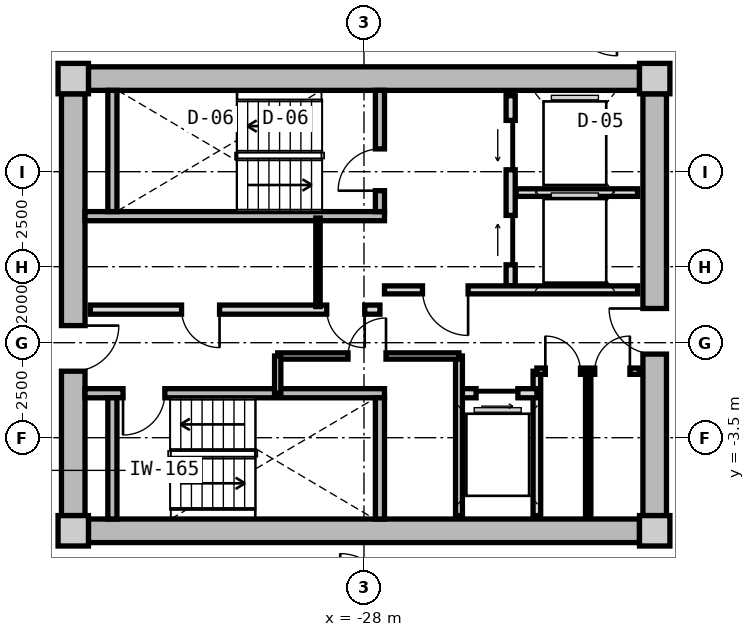
"""IFC4 building model, lengths in metres.
Left out: names, types, materials, properties, quantities, classifications, styles, units other than length and angle.
Written with IfcOpenShell. Run it as: python <this file> out.ifc"""

import sys

from ifc_helpers import new_model, si_unit, direction, frame, frame_2d, origin, origin_2d, place, context, subcontext, project, spatial, rectangle, extrude, source, transform, mapped, element, fill, save


model = new_model("IFC4")
c1 = context("Model", 3, precision=1e-05, world=origin(), true_north=direction((0.0, 1.0)))
c2 = subcontext(c1, "Body", "Model", "MODEL_VIEW")
j1 = project(units=[si_unit("LENGTHUNIT", "METRE"), si_unit("PLANEANGLEUNIT", "RADIAN")], contexts=[c1])
p1 = place(None, origin())
s1 = spatial("IfcSite", under=j1, at=p1, CompositionType="ELEMENT")
p2 = place(p1, origin())
s2 = spatial("IfcBuilding", under=s1, at=p2, CompositionType="ELEMENT")
p3 = place(p2, frame((0.0, 0.0, 161.75)))
s3 = spatial("IfcBuildingStorey", under=s2, at=p3, CompositionType="ELEMENT", Elevation=161.75)
m1 = source(origin(), c2, "Body", "SweptSolid", [
    extrude(rectangle(XDim=0.8, YDim=0.8, at=origin_2d()), origin(), (0.0, 0.0, 1.0), 3.05),
])
for number, where, z_axis, x_axis in (
    (1, (-35.65, -5.95, 0.0), (0.0, 0.0, 1.0), (1.0, 0.0, 0.0)),
    (2, (-20.35, -5.95, 0.0), (0.0, 0.0, 1.0), (1.0, 0.0, 0.0)),
    (3, (-20.35, 5.95, 0.0), (0.0, 0.0, 1.0), (1.0, 0.0, 0.0)),
    (4, (-35.65, 5.95, 0.0), (0.0, 0.0, 1.0), (1.0, 0.0, 0.0)),
):
    element("IfcColumn", number, at=place(p3, frame(where, z_axis=z_axis, x_axis=x_axis)), inside=s3, PredefinedType="COLUMN", context=c2, shape_type="MappedRepresentation", body=[
        mapped(m1, transform((0.0, 0.0, 0.0), x_axis=(1.0, 0.0, 0.0), y_axis=(0.0, 1.0, 0.0), z_axis=(0.0, 0.0, 1.0), scale=1.0)),
    ])
m2 = source(origin(), c2, "Body", "SweptSolid", [
    extrude(rectangle(XDim=14.5, YDim=0.62, at=frame_2d((7.25, 0.0))), origin(), (0.0, 0.0, 1.0), 2.81),
])
for number, where, z_axis, x_axis in (
    (5, (-35.25, 5.95, 0.0), (0.0, 0.0, 1.0), (1.0, 0.0, 0.0)),
    (6, (-20.75, -5.95, 0.0), (0.0, 0.0, 1.0), (-1.0, 0.0, 0.0)),
):
    element("IfcWall", number, at=place(p3, frame(where, z_axis=z_axis, x_axis=x_axis)), inside=s3, PredefinedType="SHEAR", context=c2, shape_type="MappedRepresentation", body=[
        mapped(m2, transform((0.0, 0.0, 0.0), x_axis=(1.0, 0.0, 0.0), y_axis=(0.0, 1.0, 0.0), z_axis=(0.0, 0.0, 1.0), scale=1.0)),
    ])
m3 = source(origin(), c2, "Body", "SweptSolid", [
    extrude(rectangle(XDim=11.1, YDim=0.62, at=frame_2d((5.55, 0.0))), origin(), (0.0, 0.0, 1.0), 2.81),
])
p4 = place(p3, frame((-35.65, -5.55, 0.0), z_axis=(0.0, 0.0, 1.0), x_axis=(0.0, 1.0, 0.0)))
e7 = element("IfcWall", 7, at=p4, inside=s3, PredefinedType="SHEAR", context=c2, shape_type="MappedRepresentation", body=[
    mapped(m3, transform((0.0, 0.0, 0.0), x_axis=(1.0, 0.0, 0.0), y_axis=(0.0, 1.0, 0.0), z_axis=(0.0, 0.0, 1.0), scale=1.0)),
])
p5 = place(p4, frame((3.8, 0.0, 0.0)))
e8 = element("IfcOpeningElement", 8, at=p5, cuts=e7, PredefinedType="OPENING", context=c2, shape_type="SweptSolid", body=[
    extrude(rectangle(XDim=1.2, YDim=2.15, at=frame_2d((0.6, 1.075))), frame((0.0, 0.32, 0.0), z_axis=(0.0, -1.0, 0.0), x_axis=(1.0, 0.0, 0.0)), (0.0, 0.0, 1.0), 0.64),
])
p6 = place(p3, frame((-20.35, 5.55, 0.0), z_axis=(0.0, 0.0, 1.0), x_axis=(0.0, -1.0, 0.0)))
e9 = element("IfcWall", 9, at=p6, inside=s3, PredefinedType="SHEAR", context=c2, shape_type="MappedRepresentation", body=[
    mapped(m3, transform((0.0, 0.0, 0.0), x_axis=(1.0, 0.0, 0.0), y_axis=(0.0, 1.0, 0.0), z_axis=(0.0, 0.0, 1.0), scale=1.0)),
])
p7 = place(p6, frame((5.65, 0.0, 0.0)))
e10 = element("IfcOpeningElement", 10, at=p7, cuts=e9, PredefinedType="OPENING", context=c2, shape_type="SweptSolid", body=[
    extrude(rectangle(XDim=1.2, YDim=2.15, at=frame_2d((0.6, 1.075))), frame((0.0, 0.32, 0.0), z_axis=(0.0, -1.0, 0.0), x_axis=(1.0, 0.0, 0.0)), (0.0, 0.0, 1.0), 0.64),
])
m4 = source(origin(), c2, "Body", "SweptSolid", [
    extrude(rectangle(XDim=7.88, YDim=0.24, at=frame_2d((3.94, 0.0))), origin(), (0.0, 0.0, 1.0), 2.81),
])
p8 = place(p3, frame((-35.34, 2.33, 0.0), z_axis=(0.0, 0.0, 1.0), x_axis=(1.0, 0.0, 0.0)))
e11 = element("IfcWall", 11, at=p8, inside=s3, PredefinedType="PARTITIONING", context=c2, shape_type="MappedRepresentation", body=[
    mapped(m4, transform((0.0, 0.0, 0.0), x_axis=(1.0, 0.0, 0.0), y_axis=(0.0, 1.0, 0.0), z_axis=(0.0, 0.0, 1.0), scale=1.0)),
])
m5 = source(origin(), c2, "Body", "SweptSolid", [
    extrude(rectangle(XDim=3.19, YDim=0.24, at=frame_2d((1.595, 0.0))), origin(), (0.0, 0.0, 1.0), 2.81),
])
p9 = place(p3, frame((-34.62, 2.45, 0.0), z_axis=(0.0, 0.0, 1.0), x_axis=(0.0, 1.0, 0.0)))
e12 = element("IfcWall", 12, at=p9, inside=s3, PredefinedType="PARTITIONING", context=c2, shape_type="MappedRepresentation", body=[
    mapped(m5, transform((0.0, 0.0, 0.0), x_axis=(1.0, 0.0, 0.0), y_axis=(0.0, 1.0, 0.0), z_axis=(0.0, 0.0, 1.0), scale=1.0)),
])
p10 = place(p3, frame((-27.58, 2.45, 0.0), z_axis=(0.0, 0.0, 1.0), x_axis=(0.0, 1.0, 0.0)))
e13 = element("IfcWall", 13, at=p10, inside=s3, PredefinedType="PARTITIONING", context=c2, shape_type="MappedRepresentation", body=[
    mapped(m5, transform((0.0, 0.0, 0.0), x_axis=(1.0, 0.0, 0.0), y_axis=(0.0, 1.0, 0.0), z_axis=(0.0, 0.0, 1.0), scale=1.0)),
])
p11 = place(p10, frame((0.55, 0.0, 0.0)))
e14 = element("IfcOpeningElement", 14, at=p11, cuts=e13, PredefinedType="OPENING", context=c2, shape_type="SweptSolid", body=[
    extrude(rectangle(XDim=1.1, YDim=2.15, at=frame_2d((0.55, 1.075))), frame((0.0, 0.13, 0.0), z_axis=(0.0, -1.0, 0.0), x_axis=(1.0, 0.0, 0.0)), (0.0, 0.0, 1.0), 0.26),
])
p12 = place(p3, frame((-35.34, -2.33, 0.0), z_axis=(0.0, 0.0, 1.0), x_axis=(1.0, 0.0, 0.0)))
e15 = element("IfcWall", 15, at=p12, inside=s3, PredefinedType="PARTITIONING", context=c2, shape_type="MappedRepresentation", body=[
    mapped(m4, transform((0.0, 0.0, 0.0), x_axis=(1.0, 0.0, 0.0), y_axis=(0.0, 1.0, 0.0), z_axis=(0.0, 0.0, 1.0), scale=1.0)),
])
p13 = place(p12, frame((1.0, 0.0, 0.0)))
e16 = element("IfcOpeningElement", 16, at=p13, cuts=e15, PredefinedType="OPENING", context=c2, shape_type="SweptSolid", body=[
    extrude(rectangle(XDim=1.1, YDim=2.15, at=frame_2d((0.55, 1.075))), frame((0.0, 0.13, 0.0), z_axis=(0.0, -1.0, 0.0), x_axis=(1.0, 0.0, 0.0)), (0.0, 0.0, 1.0), 0.26),
])
for number, where, z_axis, x_axis in (
    (17, (-34.62, -5.64, 0.0), (0.0, 0.0, 1.0), (0.0, 1.0, 0.0)),
    (18, (-27.58, -5.64, 0.0), (0.0, 0.0, 1.0), (0.0, 1.0, 0.0)),
):
    element("IfcWall", number, at=place(p3, frame(where, z_axis=z_axis, x_axis=x_axis)), inside=s3, PredefinedType="PARTITIONING", context=c2, shape_type="MappedRepresentation", body=[
        mapped(m5, transform((0.0, 0.0, 0.0), x_axis=(1.0, 0.0, 0.0), y_axis=(0.0, 1.0, 0.0), z_axis=(0.0, 0.0, 1.0), scale=1.0)),
    ])
m6 = source(origin(), c2, "Body", "SweptSolid", [
    extrude(rectangle(XDim=5.0, YDim=0.24, at=frame_2d((2.5, 0.0))), origin(), (0.0, 0.0, 1.0), 2.795),
])
p14 = place(p3, frame((-24.14, 0.5, 0.0), z_axis=(0.0, 0.0, 1.0), x_axis=(0.0, 1.0, 0.0)))
e19 = element("IfcWall", 19, at=p14, inside=s3, PredefinedType="PARTITIONING", context=c2, shape_type="MappedRepresentation", body=[
    mapped(m6, transform((0.0, 0.0, 0.0), x_axis=(1.0, 0.0, 0.0), y_axis=(0.0, 1.0, 0.0), z_axis=(0.0, 0.0, 1.0), scale=1.0)),
])
p15 = place(p14, frame((3.05, 0.0, 0.0)))
e20 = element("IfcOpeningElement", 20, at=p15, cuts=e19, PredefinedType="OPENING", context=c2, shape_type="SweptSolid", body=[
    extrude(rectangle(XDim=1.3, YDim=2.2, at=frame_2d((0.65, 1.1))), frame((0.0, 0.13, 0.0), z_axis=(0.0, -1.0, 0.0), x_axis=(1.0, 0.0, 0.0)), (0.0, 0.0, 1.0), 0.26),
])
p16 = place(p14, frame((0.55, 0.0, 0.0)))
e21 = element("IfcOpeningElement", 21, at=p16, cuts=e19, PredefinedType="OPENING", context=c2, shape_type="SweptSolid", body=[
    extrude(rectangle(XDim=1.3, YDim=2.2, at=frame_2d((0.65, 1.1))), frame((0.0, 0.13, 0.0), z_axis=(0.0, -1.0, 0.0), x_axis=(1.0, 0.0, 0.0)), (0.0, 0.0, 1.0), 0.26),
])
m7 = source(origin(), c2, "Body", "SweptSolid", [
    extrude(rectangle(XDim=3.2, YDim=0.2, at=frame_2d((1.6, 0.0))), origin(), (0.0, 0.0, 1.0), 2.795),
])
p17 = place(p3, frame((-24.0, 2.95, 0.0), z_axis=(0.0, 0.0, 1.0), x_axis=(1.0, 0.0, 0.0)))
e22 = element("IfcWall", 22, at=p17, inside=s3, PredefinedType="PARTITIONING", context=c2, shape_type="MappedRepresentation", body=[
    mapped(m7, transform((0.0, 0.0, 0.0), x_axis=(1.0, 0.0, 0.0), y_axis=(0.0, 1.0, 0.0), z_axis=(0.0, 0.0, 1.0), scale=1.0)),
])
m8 = source(origin(), c2, "Body", "SweptSolid", [
    extrude(rectangle(XDim=6.66, YDim=0.21, at=frame_2d((3.33, 0.0))), origin(), (0.0, 0.0, 1.0), 2.795),
])
p18 = place(p3, frame((-27.46, 0.39, 0.0), z_axis=(0.0, 0.0, 1.0), x_axis=(1.0, 0.0, 0.0)))
e23 = element("IfcWall", 23, at=p18, inside=s3, PredefinedType="PARTITIONING", context=c2, shape_type="MappedRepresentation", body=[
    mapped(m8, transform((0.0, 0.0, 0.0), x_axis=(1.0, 0.0, 0.0), y_axis=(0.0, 1.0, 0.0), z_axis=(0.0, 0.0, 1.0), scale=1.0)),
])
p19 = place(p18, frame((1.0, 0.0, 0.0)))
e24 = element("IfcOpeningElement", 24, at=p19, cuts=e23, PredefinedType="OPENING", context=c2, shape_type="SweptSolid", body=[
    extrude(rectangle(XDim=1.2, YDim=2.15, at=frame_2d((0.6, 1.075))), frame((0.0, 0.115, 0.0), z_axis=(0.0, -1.0, 0.0), x_axis=(1.0, 0.0, 0.0)), (0.0, 0.0, 1.0), 0.23),
])
m9 = source(origin(), c2, "Body", "SweptSolid", [
    extrude(rectangle(XDim=7.62, YDim=0.24, at=frame_2d((3.81, 0.0))), origin(), (0.0, 0.0, 1.0), 2.795),
])
p20 = place(p3, frame((-35.2, -0.13, 0.0), z_axis=(0.0, 0.0, 1.0), x_axis=(1.0, 0.0, 0.0)))
e25 = element("IfcWall", 25, at=p20, inside=s3, PredefinedType="PARTITIONING", context=c2, shape_type="MappedRepresentation", body=[
    mapped(m9, transform((0.0, 0.0, 0.0), x_axis=(1.0, 0.0, 0.0), y_axis=(0.0, 1.0, 0.0), z_axis=(0.0, 0.0, 1.0), scale=1.0)),
])
p21 = place(p20, frame((6.22, 0.0, 0.0)))
e26 = element("IfcOpeningElement", 26, at=p21, cuts=e25, PredefinedType="OPENING", context=c2, shape_type="SweptSolid", body=[
    extrude(rectangle(XDim=1.0, YDim=2.1, at=frame_2d((0.5, 1.05))), frame((0.0, 0.13, 0.0), z_axis=(0.0, -1.0, 0.0), x_axis=(1.0, 0.0, 0.0)), (0.0, 0.0, 1.0), 0.26),
])
p22 = place(p20, frame((2.4, 0.0, 0.0)))
e27 = element("IfcOpeningElement", 27, at=p22, cuts=e25, PredefinedType="OPENING", context=c2, shape_type="SweptSolid", body=[
    extrude(rectangle(XDim=1.0, YDim=2.1, at=frame_2d((0.5, 1.05))), frame((0.0, 0.13, 0.0), z_axis=(0.0, -1.0, 0.0), x_axis=(1.0, 0.0, 0.0)), (0.0, 0.0, 1.0), 0.26),
])
m10 = source(origin(), c2, "Body", "SweptSolid", [
    extrude(rectangle(XDim=2.33, YDim=0.115, at=frame_2d((1.165, 0.0))), origin(), (0.0, 0.0, 1.0), 2.795),
])
p23 = place(p3, frame((-29.21, -0.05, 0.0), z_axis=(0.0, 0.0, 1.0), x_axis=(0.0, 1.0, 0.0)))
e28 = element("IfcWall", 28, at=p23, inside=s3, PredefinedType="PARTITIONING", context=c2, shape_type="MappedRepresentation", body=[
    mapped(m10, transform((0.0, 0.0, 0.0), x_axis=(1.0, 0.0, 0.0), y_axis=(0.0, 1.0, 0.0), z_axis=(0.0, 0.0, 1.0), scale=1.0)),
])
m11 = source(origin(), c2, "Body", "SweptSolid", [
    extrude(rectangle(XDim=3.8, YDim=0.2, at=frame_2d((1.9, 0.0))), origin(), (0.0, 0.0, 1.0), 2.795),
])
p24 = place(p3, frame((-23.45, -5.55, 0.0), z_axis=(0.0, 0.0, 1.0), x_axis=(0.0, 1.0, 0.0)))
e29 = element("IfcWall", 29, at=p24, inside=s3, PredefinedType="PARTITIONING", context=c2, shape_type="MappedRepresentation", body=[
    mapped(m11, transform((0.0, 0.0, 0.0), x_axis=(1.0, 0.0, 0.0), y_axis=(0.0, 1.0, 0.0), z_axis=(0.0, 0.0, 1.0), scale=1.0)),
])
m12 = source(origin(), c2, "Body", "SweptSolid", [
    extrude(rectangle(XDim=2.05, YDim=0.24, at=frame_2d((1.025, 0.0))), origin(), (0.0, 0.0, 1.0), 2.795),
])
p25 = place(p3, frame((-25.5, -2.33, 0.0), z_axis=(0.0, 0.0, 1.0), x_axis=(1.0, 0.0, 0.0)))
e30 = element("IfcWall", 30, at=p25, inside=s3, PredefinedType="PARTITIONING", context=c2, shape_type="MappedRepresentation", body=[
    mapped(m12, transform((0.0, 0.0, 0.0), x_axis=(1.0, 0.0, 0.0), y_axis=(0.0, 1.0, 0.0), z_axis=(0.0, 0.0, 1.0), scale=1.0)),
])
p26 = place(p25, frame((0.45, 0.0, 0.0)))
e31 = element("IfcOpeningElement", 31, at=p26, cuts=e30, PredefinedType="OPENING", context=c2, shape_type="SweptSolid", body=[
    extrude(rectangle(XDim=1.1, YDim=2.2, at=frame_2d((0.55, 1.1))), frame((0.0, 0.13, 0.0), z_axis=(0.0, -1.0, 0.0), x_axis=(1.0, 0.0, 0.0)), (0.0, 0.0, 1.0), 0.26),
])
m13 = source(origin(), c2, "Body", "SweptSolid", [
    extrude(rectangle(XDim=4.2, YDim=0.18, at=frame_2d((2.1, 0.0))), origin(), (0.0, 0.0, 1.0), 2.795),
])
p27 = place(p3, frame((-25.5, -5.55, 0.0), z_axis=(0.0, 0.0, 1.0), x_axis=(0.0, 1.0, 0.0)))
e32 = element("IfcWall", 32, at=p27, inside=s3, PredefinedType="PARTITIONING", context=c2, shape_type="MappedRepresentation", body=[
    mapped(m13, transform((0.0, 0.0, 0.0), x_axis=(1.0, 0.0, 0.0), y_axis=(0.0, 1.0, 0.0), z_axis=(0.0, 0.0, 1.0), scale=1.0)),
])
m14 = source(origin(), c2, "Body", "SweptSolid", [
    extrude(rectangle(XDim=4.77, YDim=0.165, at=frame_2d((2.385, 0.0))), origin(), (0.0, 0.0, 1.0), 2.795),
])
p28 = place(p3, frame((-30.27, -1.35, 0.0), z_axis=(0.0, 0.0, 1.0), x_axis=(1.0, 0.0, 0.0)))
e33 = element("IfcWall", 33, at=p28, inside=s3, PredefinedType="PARTITIONING", context=c2, shape_type="MappedRepresentation", body=[
    mapped(m14, transform((0.0, 0.0, 0.0), x_axis=(1.0, 0.0, 0.0), y_axis=(0.0, 1.0, 0.0), z_axis=(0.0, 0.0, 1.0), scale=1.0)),
])
p29 = place(p28, frame((1.85, 0.0, 0.0)))
e34 = element("IfcOpeningElement", 34, at=p29, cuts=e33, PredefinedType="OPENING", context=c2, shape_type="SweptSolid", body=[
    extrude(rectangle(XDim=1.0, YDim=2.1, at=frame_2d((0.5, 1.05))), frame((0.0, 0.093, 0.0), z_axis=(0.0, -1.0, 0.0), x_axis=(1.0, 0.0, 0.0)), (0.0, 0.0, 1.0), 0.185),
])
m15 = source(origin(), c2, "Body", "SweptSolid", [
    extrude(rectangle(XDim=0.98, YDim=0.165, at=frame_2d((0.49, 0.0))), origin(), (0.0, 0.0, 1.0), 2.795),
])
p30 = place(p3, frame((-30.27, -2.33, 0.0), z_axis=(0.0, 0.0, 1.0), x_axis=(0.0, 1.0, 0.0)))
e35 = element("IfcWall", 35, at=p30, inside=s3, PredefinedType="PARTITIONING", context=c2, shape_type="MappedRepresentation", body=[
    mapped(m15, transform((0.0, 0.0, 0.0), x_axis=(1.0, 0.0, 0.0), y_axis=(0.0, 1.0, 0.0), z_axis=(0.0, 0.0, 1.0), scale=1.0)),
])
m16 = source(origin(), c2, "Body", "SweptSolid", [
    extrude(rectangle(XDim=2.7, YDim=0.165, at=frame_2d((1.35, 0.0))), origin(), (0.0, 0.0, 1.0), 2.795),
])
p31 = place(p3, frame((-23.45, -1.75, 0.0), z_axis=(0.0, 0.0, 1.0), x_axis=(1.0, 0.0, 0.0)))
e36 = element("IfcWall", 36, at=p31, inside=s3, PredefinedType="PARTITIONING", context=c2, shape_type="MappedRepresentation", body=[
    mapped(m16, transform((0.0, 0.0, 0.0), x_axis=(1.0, 0.0, 0.0), y_axis=(0.0, 1.0, 0.0), z_axis=(0.0, 0.0, 1.0), scale=1.0)),
])
p32 = place(p31, frame((0.222, 0.0, 0.0)))
e37 = element("IfcOpeningElement", 37, at=p32, cuts=e36, PredefinedType="OPENING", context=c2, shape_type="SweptSolid", body=[
    extrude(rectangle(XDim=0.925, YDim=2.1, at=frame_2d((0.462, 1.05))), frame((0.0, 0.093, 0.0), z_axis=(0.0, -1.0, 0.0), x_axis=(1.0, 0.0, 0.0)), (0.0, 0.0, 1.0), 0.185),
])
p33 = place(p31, frame((1.522, 0.0, 0.0)))
e38 = element("IfcOpeningElement", 38, at=p33, cuts=e36, PredefinedType="OPENING", context=c2, shape_type="SweptSolid", body=[
    extrude(rectangle(XDim=0.925, YDim=2.1, at=frame_2d((0.462, 1.05))), frame((0.0, 0.093, 0.0), z_axis=(0.0, -1.0, 0.0), x_axis=(1.0, 0.0, 0.0)), (0.0, 0.0, 1.0), 0.185),
])
m17 = source(origin(), c2, "Body", "SweptSolid", [
    extrude(rectangle(XDim=3.8, YDim=0.14, at=frame_2d((1.9, 0.0))), origin(), (0.0, 0.0, 1.0), 2.795),
])
p34 = place(p3, frame((-22.1, -5.55, 0.0), z_axis=(0.0, 0.0, 1.0), x_axis=(0.0, 1.0, 0.0)))
e39 = element("IfcWall", 39, at=p34, inside=s3, PredefinedType="PARTITIONING", context=c2, shape_type="MappedRepresentation", body=[
    mapped(m17, transform((0.0, 0.0, 0.0), x_axis=(1.0, 0.0, 0.0), y_axis=(0.0, 1.0, 0.0), z_axis=(0.0, 0.0, 1.0), scale=1.0)),
])
m18 = source(origin(), c2, "Body", "SweptSolid", [
    extrude(rectangle(XDim=1.1, YDim=2.15, at=frame_2d((0.55, 1.075))), frame((0.0, 0.025, 0.0), z_axis=(0.0, -1.0, 0.0), x_axis=(1.0, 0.0, 0.0)), (0.0, 0.0, 1.0), 0.05),
])
p35 = place(p11, origin())
e40 = element("IfcDoor", 40, at=p35, inside=s3, OperationType="SINGLE_SWING_LEFT", PredefinedType="DOOR", context=c2, shape_type="MappedRepresentation", body=[
    mapped(m18, transform((0.0, 0.0, 0.0), x_axis=(1.0, 0.0, 0.0), y_axis=(0.0, 1.0, 0.0), z_axis=(0.0, 0.0, 1.0), scale=1.0)),
])
fill(e14, e40)
p36 = place(p13, frame((1.1, 0.0, 0.0), z_axis=(0.0, 0.0, 1.0), x_axis=(-1.0, 0.0, 0.0)))
e41 = element("IfcDoor", 41, at=p36, inside=s3, OperationType="SINGLE_SWING_RIGHT", PredefinedType="DOOR", context=c2, shape_type="MappedRepresentation", body=[
    mapped(m18, transform((0.0, 0.0, 0.0), x_axis=(1.0, 0.0, 0.0), y_axis=(0.0, 1.0, 0.0), z_axis=(0.0, 0.0, 1.0), scale=1.0)),
])
fill(e16, e41)
m19 = source(origin(), c2, "Body", "SweptSolid", [
    extrude(rectangle(XDim=1.3, YDim=2.2, at=frame_2d((0.65, 1.1))), frame((0.0, 0.025, 0.0), z_axis=(0.0, -1.0, 0.0), x_axis=(1.0, 0.0, 0.0)), (0.0, 0.0, 1.0), 0.05),
])
p37 = place(p15, origin())
e42 = element("IfcDoor", 42, at=p37, inside=s3, OperationType="SLIDING_TO_LEFT", PredefinedType="DOOR", context=c2, shape_type="MappedRepresentation", body=[
    mapped(m19, transform((0.0, 0.0, 0.0), x_axis=(1.0, 0.0, 0.0), y_axis=(0.0, 1.0, 0.0), z_axis=(0.0, 0.0, 1.0), scale=1.0)),
])
fill(e20, e42)
p38 = place(p16, origin())
e43 = element("IfcDoor", 43, at=p38, inside=s3, OperationType="SLIDING_TO_RIGHT", PredefinedType="DOOR", context=c2, shape_type="MappedRepresentation", body=[
    mapped(m19, transform((0.0, 0.0, 0.0), x_axis=(1.0, 0.0, 0.0), y_axis=(0.0, 1.0, 0.0), z_axis=(0.0, 0.0, 1.0), scale=1.0)),
])
fill(e21, e43)
m20 = source(origin(), c2, "Body", "SweptSolid", [
    extrude(rectangle(XDim=1.2, YDim=2.15, at=frame_2d((0.6, 1.075))), frame((0.0, 0.025, 0.0), z_axis=(0.0, -1.0, 0.0), x_axis=(1.0, 0.0, 0.0)), (0.0, 0.0, 1.0), 0.05),
])
p39 = place(p19, frame((1.2, 0.0, 0.0), z_axis=(0.0, 0.0, 1.0), x_axis=(-1.0, 0.0, 0.0)))
e44 = element("IfcDoor", 44, at=p39, inside=s3, OperationType="SINGLE_SWING_LEFT", PredefinedType="DOOR", context=c2, shape_type="MappedRepresentation", body=[
    mapped(m20, transform((0.0, 0.0, 0.0), x_axis=(1.0, 0.0, 0.0), y_axis=(0.0, 1.0, 0.0), z_axis=(0.0, 0.0, 1.0), scale=1.0)),
])
fill(e24, e44)
p40 = place(p5, frame((1.2, 0.0, 0.0), z_axis=(0.0, 0.0, 1.0), x_axis=(-1.0, 0.0, 0.0)))
e45 = element("IfcDoor", 45, at=p40, inside=s3, OperationType="SINGLE_SWING_LEFT", PredefinedType="DOOR", context=c2, shape_type="MappedRepresentation", body=[
    mapped(m20, transform((0.0, 0.0, 0.0), x_axis=(1.0, 0.0, 0.0), y_axis=(0.0, 1.0, 0.0), z_axis=(0.0, 0.0, 1.0), scale=1.0)),
])
fill(e8, e45)
p41 = place(p7, frame((1.2, 0.0, 0.0), z_axis=(0.0, 0.0, 1.0), x_axis=(-1.0, 0.0, 0.0)))
e46 = element("IfcDoor", 46, at=p41, inside=s3, OperationType="SINGLE_SWING_RIGHT", PredefinedType="DOOR", context=c2, shape_type="MappedRepresentation", body=[
    mapped(m20, transform((0.0, 0.0, 0.0), x_axis=(1.0, 0.0, 0.0), y_axis=(0.0, 1.0, 0.0), z_axis=(0.0, 0.0, 1.0), scale=1.0)),
])
fill(e10, e46)
m21 = source(origin(), c2, "Body", "SweptSolid", [
    extrude(rectangle(XDim=1.0, YDim=2.1, at=frame_2d((0.5, 1.05))), frame((0.0, 0.025, 0.0), z_axis=(0.0, -1.0, 0.0), x_axis=(1.0, 0.0, 0.0)), (0.0, 0.0, 1.0), 0.05),
])
p42 = place(p21, frame((1.0, 0.0, 0.0), z_axis=(0.0, 0.0, 1.0), x_axis=(-1.0, 0.0, 0.0)))
e47 = element("IfcDoor", 47, at=p42, inside=s3, OperationType="SINGLE_SWING_LEFT", PredefinedType="DOOR", context=c2, shape_type="MappedRepresentation", body=[
    mapped(m21, transform((0.0, 0.0, 0.0), x_axis=(1.0, 0.0, 0.0), y_axis=(0.0, 1.0, 0.0), z_axis=(0.0, 0.0, 1.0), scale=1.0)),
])
fill(e26, e47)
p43 = place(p22, frame((1.0, 0.0, 0.0), z_axis=(0.0, 0.0, 1.0), x_axis=(-1.0, 0.0, 0.0)))
e48 = element("IfcDoor", 48, at=p43, inside=s3, OperationType="SINGLE_SWING_LEFT", PredefinedType="DOOR", context=c2, shape_type="MappedRepresentation", body=[
    mapped(m21, transform((0.0, 0.0, 0.0), x_axis=(1.0, 0.0, 0.0), y_axis=(0.0, 1.0, 0.0), z_axis=(0.0, 0.0, 1.0), scale=1.0)),
])
fill(e27, e48)
m22 = source(origin(), c2, "Body", "SweptSolid", [
    extrude(rectangle(XDim=1.1, YDim=2.2, at=frame_2d((0.55, 1.1))), frame((0.0, 0.025, 0.0), z_axis=(0.0, -1.0, 0.0), x_axis=(1.0, 0.0, 0.0)), (0.0, 0.0, 1.0), 0.05),
])
p44 = place(p26, frame((1.1, 0.0, 0.0), z_axis=(0.0, 0.0, 1.0), x_axis=(-1.0, 0.0, 0.0)))
e49 = element("IfcDoor", 49, at=p44, inside=s3, OperationType="SLIDING_TO_RIGHT", PredefinedType="DOOR", context=c2, shape_type="MappedRepresentation", body=[
    mapped(m22, transform((0.0, 0.0, 0.0), x_axis=(1.0, 0.0, 0.0), y_axis=(0.0, 1.0, 0.0), z_axis=(0.0, 0.0, 1.0), scale=1.0)),
])
fill(e31, e49)
p45 = place(p29, origin())
e50 = element("IfcDoor", 50, at=p45, inside=s3, OperationType="SINGLE_SWING_RIGHT", PredefinedType="DOOR", context=c2, shape_type="MappedRepresentation", body=[
    mapped(m21, transform((0.0, 0.0, 0.0), x_axis=(1.0, 0.0, 0.0), y_axis=(0.0, 1.0, 0.0), z_axis=(0.0, 0.0, 1.0), scale=1.0)),
])
fill(e34, e50)
m23 = source(origin(), c2, "Body", "SweptSolid", [
    extrude(rectangle(XDim=0.925, YDim=2.1, at=frame_2d((0.462, 1.05))), frame((0.0, 0.025, 0.0), z_axis=(0.0, -1.0, 0.0), x_axis=(1.0, 0.0, 0.0)), (0.0, 0.0, 1.0), 0.05),
])
p46 = place(p32, origin())
e51 = element("IfcDoor", 51, at=p46, inside=s3, OperationType="SINGLE_SWING_LEFT", PredefinedType="DOOR", context=c2, shape_type="MappedRepresentation", body=[
    mapped(m23, transform((0.0, 0.0, 0.0), x_axis=(1.0, 0.0, 0.0), y_axis=(0.0, 1.0, 0.0), z_axis=(0.0, 0.0, 1.0), scale=1.0)),
])
fill(e37, e51)
p47 = place(p33, origin())
e52 = element("IfcDoor", 52, at=p47, inside=s3, OperationType="SINGLE_SWING_RIGHT", PredefinedType="DOOR", context=c2, shape_type="MappedRepresentation", body=[
    mapped(m23, transform((0.0, 0.0, 0.0), x_axis=(1.0, 0.0, 0.0), y_axis=(0.0, 1.0, 0.0), z_axis=(0.0, 0.0, 1.0), scale=1.0)),
])
fill(e38, e52)
save(model, sys.argv[1])
